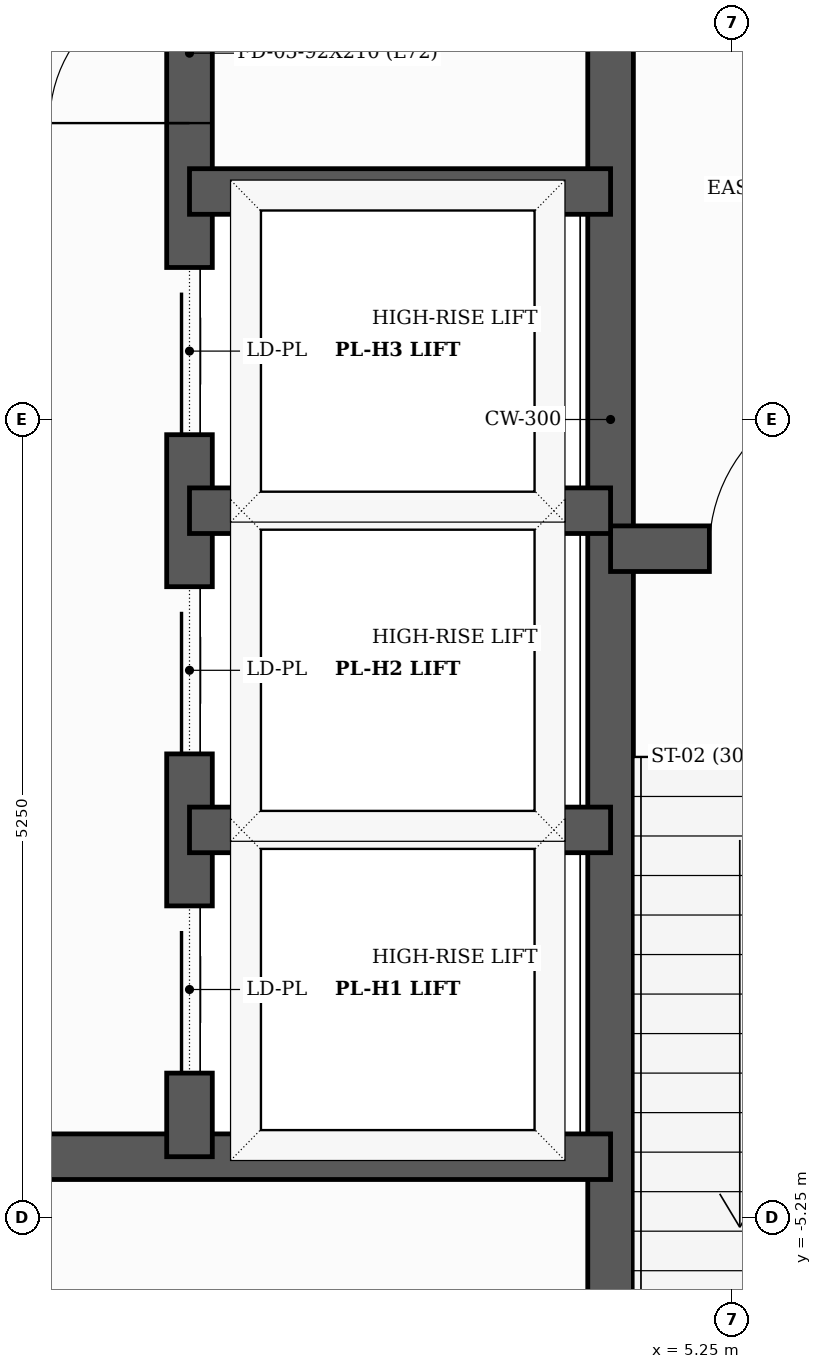
"""IFC4 building model, lengths in metres.
Left out: names, types, materials, properties, quantities, classifications, styles, units other than length and angle.
Written with IfcOpenShell. Run it as: python <this file> out.ifc"""

import sys

from ifc_helpers import new_model, si_unit, direction, frame, frame_2d, origin, place, context, subcontext, project, spatial, rectangle, extrude, element, fill, save


model = new_model("IFC4")
c1 = context("Model", 3, precision=1e-05, world=origin(), true_north=direction((0.0, 1.0)))
c2 = subcontext(c1, "Body", "Model", "MODEL_VIEW")
j1 = project(units=[si_unit("LENGTHUNIT", "METRE"), si_unit("PLANEANGLEUNIT", "RADIAN")], contexts=[c1])
p1 = place(None, origin())
s1 = spatial("IfcSite", under=j1, at=p1, CompositionType="ELEMENT")
p2 = place(p1, origin())
s2 = spatial("IfcBuilding", under=s1, at=p2, CompositionType="ELEMENT")
p3 = place(p2, frame((0.0, 0.0, 213.8)))
s3 = spatial("IfcBuildingStorey", under=s2, at=p3, CompositionType="ELEMENT", Elevation=213.8)
p4 = place(p3, frame((0.029, -28.142, 0.0), z_axis=(0.0, 0.0, 1.0), x_axis=(0.587783673123, 0.809018141706, 0.0)))
e1 = element("IfcWall", 1, at=p4, inside=s3, PredefinedType="SOLIDWALL", context=c2, shape_type="SweptSolid", body=[
    extrude(rectangle(XDim=45.5, YDim=0.22, at=frame_2d((22.75, 0.0))), origin(), (0.0, 0.0, 1.0), 4.4),
])
p5 = place(p3, frame((4.45, -7.79, 0.0), z_axis=(0.0, 0.0, 1.0), x_axis=(0.0, 1.0, 0.0)))
e2 = element("IfcWall", 2, at=p5, inside=s3, PredefinedType="SHEAR", context=c2, shape_type="SweptSolid", body=[
    extrude(rectangle(XDim=15.58, YDim=0.3, at=frame_2d((7.79, 0.0))), origin(), (0.0, 0.0, 1.0), 4.9),
])
p6 = place(p3, frame((4.45, -0.85, 0.0), z_axis=(0.0, 0.0, 1.0), x_axis=(1.0, 0.0, 0.0)))
e3 = element("IfcWall", 3, at=p6, inside=s3, PredefinedType="SHEAR", context=c2, shape_type="SweptSolid", body=[
    extrude(rectangle(XDim=3.34, YDim=0.3, at=frame_2d((1.67, 0.0))), origin(), (0.0, 0.0, 1.0), 4.9),
])
p7 = place(p6, frame((0.65, 0.0, 0.0)))
e4 = element("IfcOpeningElement", 4, at=p7, cuts=e3, PredefinedType="OPENING", context=c2, shape_type="SweptSolid", body=[
    extrude(rectangle(XDim=1.05, YDim=2.15, at=frame_2d((0.525, 1.075))), frame((0.0, 0.16, 0.0), z_axis=(0.0, -1.0, 0.0), x_axis=(1.0, 0.0, 0.0)), (0.0, 0.0, 1.0), 0.32),
])
p8 = place(p3, frame((-4.45, -4.85, 0.0), z_axis=(0.0, 0.0, 1.0), x_axis=(1.0, 0.0, 0.0)))
e5 = element("IfcWall", 5, at=p8, inside=s3, PredefinedType="SHEAR", context=c2, shape_type="SweptSolid", body=[
    extrude(rectangle(XDim=8.9, YDim=0.3, at=frame_2d((4.45, 0.0))), origin(), (0.0, 0.0, 1.0), 4.9),
])
p9 = place(p3, frame((1.68, -4.85, 0.0), z_axis=(0.0, 0.0, 1.0), x_axis=(0.0, 1.0, 0.0)))
e6 = element("IfcWall", 6, at=p9, inside=s3, PredefinedType="SHEAR", context=c2, shape_type="SweptSolid", body=[
    extrude(rectangle(XDim=12.64, YDim=0.3, at=frame_2d((6.32, 0.0))), origin(), (0.0, 0.0, 1.0), 4.9),
])
p10 = place(p9, frame((0.55, 0.0, 0.0)))
e7 = element("IfcOpeningElement", 7, at=p10, cuts=e6, PredefinedType="OPENING", context=c2, shape_type="SweptSolid", body=[
    extrude(rectangle(XDim=1.1, YDim=2.1, at=frame_2d((0.55, 1.05))), frame((0.0, 0.16, 0.0), z_axis=(0.0, -1.0, 0.0), x_axis=(1.0, 0.0, 0.0)), (0.0, 0.0, 1.0), 0.32),
])
p11 = place(p9, frame((2.65, 0.0, 0.0)))
e8 = element("IfcOpeningElement", 8, at=p11, cuts=e6, PredefinedType="OPENING", context=c2, shape_type="SweptSolid", body=[
    extrude(rectangle(XDim=1.1, YDim=2.1, at=frame_2d((0.55, 1.05))), frame((0.0, 0.16, 0.0), z_axis=(0.0, -1.0, 0.0), x_axis=(1.0, 0.0, 0.0)), (0.0, 0.0, 1.0), 0.32),
])
p12 = place(p9, frame((4.75, 0.0, 0.0)))
e9 = element("IfcOpeningElement", 9, at=p12, cuts=e6, PredefinedType="OPENING", context=c2, shape_type="SweptSolid", body=[
    extrude(rectangle(XDim=1.1, YDim=2.1, at=frame_2d((0.55, 1.05))), frame((0.0, 0.16, 0.0), z_axis=(0.0, -1.0, 0.0), x_axis=(1.0, 0.0, 0.0)), (0.0, 0.0, 1.0), 0.32),
])
p13 = place(p9, frame((9.0, 0.0, 0.0)))
e10 = element("IfcOpeningElement", 10, at=p13, cuts=e6, PredefinedType="OPENING", context=c2, shape_type="SweptSolid", body=[
    extrude(rectangle(XDim=0.95, YDim=2.1, at=frame_2d((0.475, 1.05))), frame((0.0, 0.16, 0.0), z_axis=(0.0, -1.0, 0.0), x_axis=(1.0, 0.0, 0.0)), (0.0, 0.0, 1.0), 0.32),
])
for number, where, z_axis, x_axis in (
    (11, (1.68, 1.5, 0.0), (0.0, 0.0, 1.0), (1.0, 0.0, 0.0)),
    (12, (1.68, -2.7, 0.0), (0.0, 0.0, 1.0), (1.0, 0.0, 0.0)),
    (13, (1.68, -0.6, 0.0), (0.0, 0.0, 1.0), (1.0, 0.0, 0.0)),
):
    element("IfcWall", number, at=place(p3, frame(where, z_axis=z_axis, x_axis=x_axis)), inside=s3, PredefinedType="SHEAR", context=c2, shape_type="SweptSolid", body=[
        extrude(rectangle(XDim=2.77, YDim=0.3, at=frame_2d((1.385, 0.0))), origin(), (0.0, 0.0, 1.0), 4.9),
    ])
p14 = place(p3, frame((25.612, 9.281, 0.0), z_axis=(0.0, 0.0, 1.0), x_axis=(-0.587784319349, -0.809017672197, 0.0)))
e14 = element("IfcWall", 14, at=p14, inside=s3, PredefinedType="SOLIDWALL", context=c2, shape_type="SweptSolid", body=[
    extrude(rectangle(XDim=45.126, YDim=0.16, at=frame_2d((22.563, 0.0))), origin(), (0.0, 0.0, 1.0), 3.485),
])
p15 = place(p7, origin())
e15 = element("IfcDoor", 15, at=p15, inside=s3, OperationType="SINGLE_SWING_RIGHT", PredefinedType="DOOR", context=c2, shape_type="SweptSolid", body=[
    extrude(rectangle(XDim=1.05, YDim=2.15, at=frame_2d((0.525, 1.075))), frame((0.0, 0.025, 0.0), z_axis=(0.0, -1.0, 0.0), x_axis=(1.0, 0.0, 0.0)), (0.0, 0.0, 1.0), 0.05),
])
fill(e4, e15)
p16 = place(p10, origin())
e16 = element("IfcDoor", 16, at=p16, inside=s3, OperationType="SLIDING_TO_LEFT", PredefinedType="DOOR", context=c2, shape_type="SweptSolid", body=[
    extrude(rectangle(XDim=1.1, YDim=2.1, at=frame_2d((0.55, 1.05))), frame((0.0, 0.025, 0.0), z_axis=(0.0, -1.0, 0.0), x_axis=(1.0, 0.0, 0.0)), (0.0, 0.0, 1.0), 0.05),
])
fill(e7, e16)
p17 = place(p11, origin())
e17 = element("IfcDoor", 17, at=p17, inside=s3, OperationType="SLIDING_TO_LEFT", PredefinedType="DOOR", context=c2, shape_type="SweptSolid", body=[
    extrude(rectangle(XDim=1.1, YDim=2.1, at=frame_2d((0.55, 1.05))), frame((0.0, 0.025, 0.0), z_axis=(0.0, -1.0, 0.0), x_axis=(1.0, 0.0, 0.0)), (0.0, 0.0, 1.0), 0.05),
])
fill(e8, e17)
p18 = place(p12, origin())
e18 = element("IfcDoor", 18, at=p18, inside=s3, OperationType="SLIDING_TO_LEFT", PredefinedType="DOOR", context=c2, shape_type="SweptSolid", body=[
    extrude(rectangle(XDim=1.1, YDim=2.1, at=frame_2d((0.55, 1.05))), frame((0.0, 0.025, 0.0), z_axis=(0.0, -1.0, 0.0), x_axis=(1.0, 0.0, 0.0)), (0.0, 0.0, 1.0), 0.05),
])
fill(e9, e18)
save(model, sys.argv[1])
